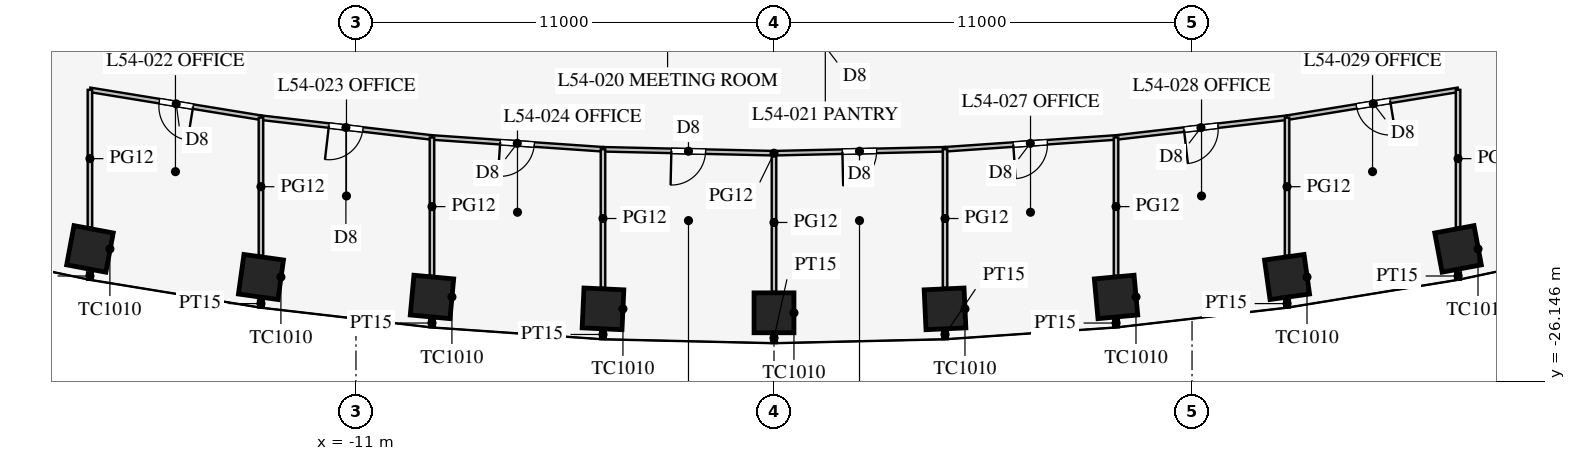
"""IFC4 building model, lengths in metres.
Left out: names, types, materials, properties, quantities, classifications, styles, units other than length and angle.
Written with IfcOpenShell. Run it as: python <this file> out.ifc"""

import sys

from ifc_helpers import new_model, si_unit, direction, frame, frame_2d, origin, origin_2d, place, context, subcontext, project, spatial, rectangle, extrude, element, fill, save


model = new_model("IFC4")
c1 = context("Model", 3, precision=1e-05, world=origin(), true_north=direction((0.0, 1.0)))
c2 = subcontext(c1, "Body", "Model", "MODEL_VIEW")
j1 = project(units=[si_unit("LENGTHUNIT", "METRE"), si_unit("PLANEANGLEUNIT", "RADIAN")], contexts=[c1])
p1 = place(None, origin())
s1 = spatial("IfcSite", under=j1, at=p1, CompositionType="ELEMENT")
p2 = place(p1, origin())
s2 = spatial("IfcBuilding", under=s1, at=p2, CompositionType="ELEMENT")
p3 = place(p2, frame((0.0, 0.0, 235.9)))
s3 = spatial("IfcBuildingStorey", under=s2, at=p3, CompositionType="ELEMENT", Elevation=235.9)
for number, where, z_axis, x_axis in (
    (1, (-18.0, -22.669, 0.0), (0.0, 0.0, 1.0), (0.983, -0.184, 0.0)),
    (2, (-13.5, -23.408, 0.0), (0.0, 0.0, 1.0), (0.99, -0.138, 0.0)),
    (3, (-9.0, -23.933, 0.0), (0.0, 0.0, 1.0), (0.996, -0.092, 0.0)),
    (4, (-4.5, -24.246, 0.0), (0.0, 0.0, 1.0), (0.999, -0.046, 0.0)),
    (5, (0.0, -24.351, 0.0), (0.0, 0.0, 1.0), (1.0, 0.0, 0.0)),
    (6, (4.5, -24.246, 0.0), (0.0, 0.0, 1.0), (0.999, 0.046, 0.0)),
    (7, (9.0, -23.933, 0.0), (0.0, 0.0, 1.0), (0.996, 0.092, 0.0)),
    (8, (13.5, -23.408, 0.0), (0.0, 0.0, 1.0), (0.99, 0.138, 0.0)),
    (9, (18.0, -22.669, 0.0), (0.0, 0.0, 1.0), (0.983, 0.184, 0.0)),
):
    element("IfcColumn", number, at=place(p3, frame(where, z_axis=z_axis, x_axis=x_axis)), inside=s3, PredefinedType="COLUMN", context=c2, shape_type="SweptSolid", body=[
        extrude(rectangle(XDim=1.05, YDim=1.05, at=origin_2d()), origin(), (0.0, 0.0, 1.0), 4.2),
    ])
p4 = place(p3, frame((13.5, -24.005, 0.0), z_axis=(0.0, 0.0, 1.0), x_axis=(0.0, -1.0, 0.0)))
e10 = element("IfcWall", 10, at=p4, inside=s3, PredefinedType="PARTITIONING", context=c2, shape_type="SweptSolid", body=[
    extrude(rectangle(XDim=0.206, YDim=0.15, at=frame_2d((0.103, 0.0))), origin(), (0.0, 0.0, 1.0), 2.9),
])
p5 = place(p3, frame((18.0, -23.286, 0.0), z_axis=(0.0, 0.0, 1.0), x_axis=(0.0, -1.0, 0.0)))
e11 = element("IfcWall", 11, at=p5, inside=s3, PredefinedType="PARTITIONING", context=c2, shape_type="SweptSolid", body=[
    extrude(rectangle(XDim=0.192, YDim=0.15, at=frame_2d((0.096, 0.0))), origin(), (0.0, 0.0, 1.0), 2.9),
])
p6 = place(p3, frame((4.5, -24.799, 0.0), z_axis=(0.0, 0.0, 1.0), x_axis=(0.0, -1.0, 0.0)))
e12 = element("IfcWall", 12, at=p6, inside=s3, PredefinedType="PARTITIONING", context=c2, shape_type="SweptSolid", body=[
    extrude(rectangle(XDim=0.243, YDim=0.15, at=frame_2d((0.122, 0.0))), origin(), (0.0, 0.0, 1.0), 2.9),
])
p7 = place(p3, frame((9.0, -24.508, 0.0), z_axis=(0.0, 0.0, 1.0), x_axis=(0.0, -1.0, 0.0)))
e13 = element("IfcWall", 13, at=p7, inside=s3, PredefinedType="PARTITIONING", context=c2, shape_type="SweptSolid", body=[
    extrude(rectangle(XDim=0.223, YDim=0.15, at=frame_2d((0.112, 0.0))), origin(), (0.0, 0.0, 1.0), 2.9),
])
p8 = place(p3, frame((0.0, -24.88, 0.0), z_axis=(0.0, 0.0, 1.0), x_axis=(0.0, -1.0, 0.0)))
e14 = element("IfcWall", 14, at=p8, inside=s3, PredefinedType="PARTITIONING", context=c2, shape_type="SweptSolid", body=[
    extrude(rectangle(XDim=0.266, YDim=0.15, at=frame_2d((0.133, 0.0))), origin(), (0.0, 0.0, 1.0), 2.9),
])
p9 = place(p3, frame((-13.5, -24.005, 0.0), z_axis=(0.0, 0.0, 1.0), x_axis=(0.0, -1.0, 0.0)))
e15 = element("IfcWall", 15, at=p9, inside=s3, PredefinedType="PARTITIONING", context=c2, shape_type="SweptSolid", body=[
    extrude(rectangle(XDim=0.206, YDim=0.15, at=frame_2d((0.103, 0.0))), origin(), (0.0, 0.0, 1.0), 2.9),
])
p10 = place(p3, frame((-18.0, -23.286, 0.0), z_axis=(0.0, 0.0, 1.0), x_axis=(0.0, -1.0, 0.0)))
e16 = element("IfcWall", 16, at=p10, inside=s3, PredefinedType="PARTITIONING", context=c2, shape_type="SweptSolid", body=[
    extrude(rectangle(XDim=0.192, YDim=0.15, at=frame_2d((0.096, 0.0))), origin(), (0.0, 0.0, 1.0), 2.9),
])
p11 = place(p3, frame((-4.5, -24.799, 0.0), z_axis=(0.0, 0.0, 1.0), x_axis=(0.0, -1.0, 0.0)))
e17 = element("IfcWall", 17, at=p11, inside=s3, PredefinedType="PARTITIONING", context=c2, shape_type="SweptSolid", body=[
    extrude(rectangle(XDim=0.243, YDim=0.15, at=frame_2d((0.122, 0.0))), origin(), (0.0, 0.0, 1.0), 2.9),
])
p12 = place(p3, frame((-9.0, -24.508, 0.0), z_axis=(0.0, 0.0, 1.0), x_axis=(0.0, -1.0, 0.0)))
e18 = element("IfcWall", 18, at=p12, inside=s3, PredefinedType="PARTITIONING", context=c2, shape_type="SweptSolid", body=[
    extrude(rectangle(XDim=0.223, YDim=0.15, at=frame_2d((0.112, 0.0))), origin(), (0.0, 0.0, 1.0), 2.9),
])
p13 = place(p3, frame((0.0, -20.151, 0.0), z_axis=(0.0, 0.0, 1.0), x_axis=(0.99973552509, 0.022997388381, 0.0)))
e19 = element("IfcWall", 19, at=p13, inside=s3, PredefinedType="PARTITIONING", context=c2, shape_type="SweptSolid", body=[
    extrude(rectangle(XDim=4.501, YDim=0.12, at=frame_2d((2.25, 0.0))), origin(), (0.0, 0.0, 1.0), 2.9),
])
p14 = place(p13, frame((1.8, 0.0, 0.15)))
e20 = element("IfcOpeningElement", 20, at=p14, cuts=e19, PredefinedType="OPENING", context=c2, shape_type="SweptSolid", body=[
    extrude(rectangle(XDim=0.9, YDim=2.1, at=frame_2d((0.45, 1.05))), frame((0.0, 0.07, 0.0), z_axis=(0.0, -1.0, 0.0), x_axis=(1.0, 0.0, 0.0)), (0.0, 0.0, 1.0), 0.14),
])
p15 = place(p3, frame((13.5, -19.216, 0.0), z_axis=(0.0, 0.0, 1.0), x_axis=(0.986986525477, 0.160802980469, 0.0)))
e21 = element("IfcWall", 21, at=p15, inside=s3, PredefinedType="PARTITIONING", context=c2, shape_type="SweptSolid", body=[
    extrude(rectangle(XDim=4.559, YDim=0.12, at=frame_2d((2.28, 0.0))), origin(), (0.0, 0.0, 1.0), 2.9),
])
p16 = place(p15, frame((1.85, 0.0, 0.15)))
e22 = element("IfcOpeningElement", 22, at=p16, cuts=e21, PredefinedType="OPENING", context=c2, shape_type="SweptSolid", body=[
    extrude(rectangle(XDim=0.9, YDim=2.1, at=frame_2d((0.45, 1.05))), frame((0.0, 0.07, 0.0), z_axis=(0.0, -1.0, 0.0), x_axis=(1.0, 0.0, 0.0)), (0.0, 0.0, 1.0), 0.14),
])
p17 = place(p3, frame((4.5, -20.047, 0.0), z_axis=(0.0, 0.0, 1.0), x_axis=(0.997623533978, 0.068900540297, 0.0)))
e23 = element("IfcWall", 23, at=p17, inside=s3, PredefinedType="PARTITIONING", context=c2, shape_type="SweptSolid", body=[
    extrude(rectangle(XDim=4.511, YDim=0.12, at=frame_2d((2.255, 0.0))), origin(), (0.0, 0.0, 1.0), 2.9),
])
p18 = place(p17, frame((1.8, 0.0, 0.15)))
e24 = element("IfcOpeningElement", 24, at=p18, cuts=e23, PredefinedType="OPENING", context=c2, shape_type="SweptSolid", body=[
    extrude(rectangle(XDim=0.9, YDim=2.1, at=frame_2d((0.45, 1.05))), frame((0.0, 0.07, 0.0), z_axis=(0.0, -1.0, 0.0), x_axis=(1.0, 0.0, 0.0)), (0.0, 0.0, 1.0), 0.14),
])
p19 = place(p3, frame((9.0, -19.736, 0.0), z_axis=(0.0, 0.0, 1.0), x_axis=(0.993382946625, 0.114849124309, 0.0)))
e25 = element("IfcWall", 25, at=p19, inside=s3, PredefinedType="PARTITIONING", context=c2, shape_type="SweptSolid", body=[
    extrude(rectangle(XDim=4.53, YDim=0.12, at=frame_2d((2.265, 0.0))), origin(), (0.0, 0.0, 1.0), 2.9),
])
p20 = place(p19, frame((1.8, 0.0, 0.15)))
e26 = element("IfcOpeningElement", 26, at=p20, cuts=e25, PredefinedType="OPENING", context=c2, shape_type="SweptSolid", body=[
    extrude(rectangle(XDim=0.9, YDim=2.1, at=frame_2d((0.45, 1.05))), frame((0.0, 0.07, 0.0), z_axis=(0.0, -1.0, 0.0), x_axis=(1.0, 0.0, 0.0)), (0.0, 0.0, 1.0), 0.14),
])
p21 = place(p3, frame((-13.5, -19.216, 0.0), z_axis=(0.0, 0.0, 1.0), x_axis=(0.993382946625, -0.114849124309, 0.0)))
e27 = element("IfcWall", 27, at=p21, inside=s3, PredefinedType="PARTITIONING", context=c2, shape_type="SweptSolid", body=[
    extrude(rectangle(XDim=4.53, YDim=0.12, at=frame_2d((2.265, 0.0))), origin(), (0.0, 0.0, 1.0), 2.9),
])
p22 = place(p21, frame((1.8, 0.0, 0.15)))
e28 = element("IfcOpeningElement", 28, at=p22, cuts=e27, PredefinedType="OPENING", context=c2, shape_type="SweptSolid", body=[
    extrude(rectangle(XDim=0.9, YDim=2.1, at=frame_2d((0.45, 1.05))), frame((0.0, 0.07, 0.0), z_axis=(0.0, -1.0, 0.0), x_axis=(1.0, 0.0, 0.0)), (0.0, 0.0, 1.0), 0.14),
])
p23 = place(p3, frame((-18.0, -18.483, 0.0), z_axis=(0.0, 0.0, 1.0), x_axis=(0.986986525477, -0.160802980469, 0.0)))
e29 = element("IfcWall", 29, at=p23, inside=s3, PredefinedType="PARTITIONING", context=c2, shape_type="SweptSolid", body=[
    extrude(rectangle(XDim=4.559, YDim=0.12, at=frame_2d((2.28, 0.0))), origin(), (0.0, 0.0, 1.0), 2.9),
])
p24 = place(p23, frame((1.85, 0.0, 0.15)))
e30 = element("IfcOpeningElement", 30, at=p24, cuts=e29, PredefinedType="OPENING", context=c2, shape_type="SweptSolid", body=[
    extrude(rectangle(XDim=0.9, YDim=2.1, at=frame_2d((0.45, 1.05))), frame((0.0, 0.07, 0.0), z_axis=(0.0, -1.0, 0.0), x_axis=(1.0, 0.0, 0.0)), (0.0, 0.0, 1.0), 0.14),
])
p25 = place(p3, frame((-4.5, -20.047, 0.0), z_axis=(0.0, 0.0, 1.0), x_axis=(0.99973552509, -0.022997388381, 0.0)))
e31 = element("IfcWall", 31, at=p25, inside=s3, PredefinedType="PARTITIONING", context=c2, shape_type="SweptSolid", body=[
    extrude(rectangle(XDim=4.501, YDim=0.12, at=frame_2d((2.25, 0.0))), origin(), (0.0, 0.0, 1.0), 2.9),
])
p26 = place(p25, frame((1.8, 0.0, 0.15)))
e32 = element("IfcOpeningElement", 32, at=p26, cuts=e31, PredefinedType="OPENING", context=c2, shape_type="SweptSolid", body=[
    extrude(rectangle(XDim=0.9, YDim=2.1, at=frame_2d((0.45, 1.05))), frame((0.0, 0.07, 0.0), z_axis=(0.0, -1.0, 0.0), x_axis=(1.0, 0.0, 0.0)), (0.0, 0.0, 1.0), 0.14),
])
p27 = place(p3, frame((-9.0, -19.736, 0.0), z_axis=(0.0, 0.0, 1.0), x_axis=(0.997623533978, -0.068900540297, 0.0)))
e33 = element("IfcWall", 33, at=p27, inside=s3, PredefinedType="PARTITIONING", context=c2, shape_type="SweptSolid", body=[
    extrude(rectangle(XDim=4.511, YDim=0.12, at=frame_2d((2.255, 0.0))), origin(), (0.0, 0.0, 1.0), 2.9),
])
p28 = place(p27, frame((1.8, 0.0, 0.15)))
e34 = element("IfcOpeningElement", 34, at=p28, cuts=e33, PredefinedType="OPENING", context=c2, shape_type="SweptSolid", body=[
    extrude(rectangle(XDim=0.9, YDim=2.1, at=frame_2d((0.45, 1.05))), frame((0.0, 0.07, 0.0), z_axis=(0.0, -1.0, 0.0), x_axis=(1.0, 0.0, 0.0)), (0.0, 0.0, 1.0), 0.14),
])
p29 = place(p3, frame((0.0, -20.151, 0.0), z_axis=(0.0, 0.0, 1.0), x_axis=(0.0, -1.0, 0.0)))
e35 = element("IfcWall", 35, at=p29, inside=s3, PredefinedType="PARTITIONING", context=c2, shape_type="SweptSolid", body=[
    extrude(rectangle(XDim=3.645, YDim=0.12, at=frame_2d((1.823, 0.0))), origin(), (0.0, 0.0, 1.0), 2.9),
])
p30 = place(p3, frame((13.5, -19.216, 0.0), z_axis=(0.0, 0.0, 1.0), x_axis=(0.0, -1.0, 0.0)))
e36 = element("IfcWall", 36, at=p30, inside=s3, PredefinedType="PARTITIONING", context=c2, shape_type="SweptSolid", body=[
    extrude(rectangle(XDim=3.632, YDim=0.12, at=frame_2d((1.816, 0.0))), origin(), (0.0, 0.0, 1.0), 2.9),
])
p31 = place(p3, frame((18.0, -18.483, 0.0), z_axis=(0.0, 0.0, 1.0), x_axis=(0.0, -1.0, 0.0)))
e37 = element("IfcWall", 37, at=p31, inside=s3, PredefinedType="PARTITIONING", context=c2, shape_type="SweptSolid", body=[
    extrude(rectangle(XDim=3.622, YDim=0.12, at=frame_2d((1.811, 0.0))), origin(), (0.0, 0.0, 1.0), 2.9),
])
p32 = place(p3, frame((4.5, -20.047, 0.0), z_axis=(0.0, 0.0, 1.0), x_axis=(0.0, -1.0, 0.0)))
e38 = element("IfcWall", 38, at=p32, inside=s3, PredefinedType="PARTITIONING", context=c2, shape_type="SweptSolid", body=[
    extrude(rectangle(XDim=3.644, YDim=0.12, at=frame_2d((1.822, 0.0))), origin(), (0.0, 0.0, 1.0), 2.9),
])
p33 = place(p3, frame((9.0, -19.736, 0.0), z_axis=(0.0, 0.0, 1.0), x_axis=(0.0, -1.0, 0.0)))
e39 = element("IfcWall", 39, at=p33, inside=s3, PredefinedType="PARTITIONING", context=c2, shape_type="SweptSolid", body=[
    extrude(rectangle(XDim=3.639, YDim=0.12, at=frame_2d((1.82, 0.0))), origin(), (0.0, 0.0, 1.0), 2.9),
])
p34 = place(p3, frame((-13.5, -19.216, 0.0), z_axis=(0.0, 0.0, 1.0), x_axis=(0.0, -1.0, 0.0)))
e40 = element("IfcWall", 40, at=p34, inside=s3, PredefinedType="PARTITIONING", context=c2, shape_type="SweptSolid", body=[
    extrude(rectangle(XDim=3.632, YDim=0.12, at=frame_2d((1.816, 0.0))), origin(), (0.0, 0.0, 1.0), 2.9),
])
p35 = place(p3, frame((-18.0, -18.483, 0.0), z_axis=(0.0, 0.0, 1.0), x_axis=(0.0, -1.0, 0.0)))
e41 = element("IfcWall", 41, at=p35, inside=s3, PredefinedType="PARTITIONING", context=c2, shape_type="SweptSolid", body=[
    extrude(rectangle(XDim=3.622, YDim=0.12, at=frame_2d((1.811, 0.0))), origin(), (0.0, 0.0, 1.0), 2.9),
])
p36 = place(p3, frame((-4.5, -20.047, 0.0), z_axis=(0.0, 0.0, 1.0), x_axis=(0.0, -1.0, 0.0)))
e42 = element("IfcWall", 42, at=p36, inside=s3, PredefinedType="PARTITIONING", context=c2, shape_type="SweptSolid", body=[
    extrude(rectangle(XDim=3.644, YDim=0.12, at=frame_2d((1.822, 0.0))), origin(), (0.0, 0.0, 1.0), 2.9),
])
p37 = place(p3, frame((-9.0, -19.736, 0.0), z_axis=(0.0, 0.0, 1.0), x_axis=(0.0, -1.0, 0.0)))
e43 = element("IfcWall", 43, at=p37, inside=s3, PredefinedType="PARTITIONING", context=c2, shape_type="SweptSolid", body=[
    extrude(rectangle(XDim=3.639, YDim=0.12, at=frame_2d((1.82, 0.0))), origin(), (0.0, 0.0, 1.0), 2.9),
])
p38 = place(p24, frame((0.9, 0.0, 0.0), z_axis=(0.0, 0.0, 1.0), x_axis=(-1.0, 0.0, 0.0)))
e44 = element("IfcDoor", 44, at=p38, inside=s3, OperationType="SINGLE_SWING_LEFT", PredefinedType="DOOR", context=c2, shape_type="SweptSolid", body=[
    extrude(rectangle(XDim=0.9, YDim=2.1, at=frame_2d((0.45, 1.05))), frame((0.0, 0.025, 0.0), z_axis=(0.0, -1.0, 0.0), x_axis=(1.0, 0.0, 0.0)), (0.0, 0.0, 1.0), 0.05),
])
fill(e30, e44)
p39 = place(p22, frame((0.9, 0.0, 0.0), z_axis=(0.0, 0.0, 1.0), x_axis=(-1.0, 0.0, 0.0)))
e45 = element("IfcDoor", 45, at=p39, inside=s3, OperationType="SINGLE_SWING_RIGHT", PredefinedType="DOOR", context=c2, shape_type="SweptSolid", body=[
    extrude(rectangle(XDim=0.9, YDim=2.1, at=frame_2d((0.45, 1.05))), frame((0.0, 0.025, 0.0), z_axis=(0.0, -1.0, 0.0), x_axis=(1.0, 0.0, 0.0)), (0.0, 0.0, 1.0), 0.05),
])
fill(e28, e45)
p40 = place(p28, frame((0.9, 0.0, 0.0), z_axis=(0.0, 0.0, 1.0), x_axis=(-1.0, 0.0, 0.0)))
e46 = element("IfcDoor", 46, at=p40, inside=s3, OperationType="SINGLE_SWING_RIGHT", PredefinedType="DOOR", context=c2, shape_type="SweptSolid", body=[
    extrude(rectangle(XDim=0.9, YDim=2.1, at=frame_2d((0.45, 1.05))), frame((0.0, 0.025, 0.0), z_axis=(0.0, -1.0, 0.0), x_axis=(1.0, 0.0, 0.0)), (0.0, 0.0, 1.0), 0.05),
])
fill(e34, e46)
p41 = place(p26, frame((0.9, 0.0, 0.0), z_axis=(0.0, 0.0, 1.0), x_axis=(-1.0, 0.0, 0.0)))
e47 = element("IfcDoor", 47, at=p41, inside=s3, OperationType="SINGLE_SWING_RIGHT", PredefinedType="DOOR", context=c2, shape_type="SweptSolid", body=[
    extrude(rectangle(XDim=0.9, YDim=2.1, at=frame_2d((0.45, 1.05))), frame((0.0, 0.025, 0.0), z_axis=(0.0, -1.0, 0.0), x_axis=(1.0, 0.0, 0.0)), (0.0, 0.0, 1.0), 0.05),
])
fill(e32, e47)
p42 = place(p14, frame((0.9, 0.0, 0.0), z_axis=(0.0, 0.0, 1.0), x_axis=(-1.0, 0.0, 0.0)))
e48 = element("IfcDoor", 48, at=p42, inside=s3, OperationType="SINGLE_SWING_RIGHT", PredefinedType="DOOR", context=c2, shape_type="SweptSolid", body=[
    extrude(rectangle(XDim=0.9, YDim=2.1, at=frame_2d((0.45, 1.05))), frame((0.0, 0.025, 0.0), z_axis=(0.0, -1.0, 0.0), x_axis=(1.0, 0.0, 0.0)), (0.0, 0.0, 1.0), 0.05),
])
fill(e20, e48)
p43 = place(p18, frame((0.9, 0.0, 0.0), z_axis=(0.0, 0.0, 1.0), x_axis=(-1.0, 0.0, 0.0)))
e49 = element("IfcDoor", 49, at=p43, inside=s3, OperationType="SINGLE_SWING_RIGHT", PredefinedType="DOOR", context=c2, shape_type="SweptSolid", body=[
    extrude(rectangle(XDim=0.9, YDim=2.1, at=frame_2d((0.45, 1.05))), frame((0.0, 0.025, 0.0), z_axis=(0.0, -1.0, 0.0), x_axis=(1.0, 0.0, 0.0)), (0.0, 0.0, 1.0), 0.05),
])
fill(e24, e49)
p44 = place(p20, frame((0.9, 0.0, 0.0), z_axis=(0.0, 0.0, 1.0), x_axis=(-1.0, 0.0, 0.0)))
e50 = element("IfcDoor", 50, at=p44, inside=s3, OperationType="SINGLE_SWING_RIGHT", PredefinedType="DOOR", context=c2, shape_type="SweptSolid", body=[
    extrude(rectangle(XDim=0.9, YDim=2.1, at=frame_2d((0.45, 1.05))), frame((0.0, 0.025, 0.0), z_axis=(0.0, -1.0, 0.0), x_axis=(1.0, 0.0, 0.0)), (0.0, 0.0, 1.0), 0.05),
])
fill(e26, e50)
p45 = place(p16, frame((0.9, 0.0, 0.0), z_axis=(0.0, 0.0, 1.0), x_axis=(-1.0, 0.0, 0.0)))
e51 = element("IfcDoor", 51, at=p45, inside=s3, OperationType="SINGLE_SWING_LEFT", PredefinedType="DOOR", context=c2, shape_type="SweptSolid", body=[
    extrude(rectangle(XDim=0.9, YDim=2.1, at=frame_2d((0.45, 1.05))), frame((0.0, 0.025, 0.0), z_axis=(0.0, -1.0, 0.0), x_axis=(1.0, 0.0, 0.0)), (0.0, 0.0, 1.0), 0.05),
])
fill(e22, e51)
save(model, sys.argv[1])
